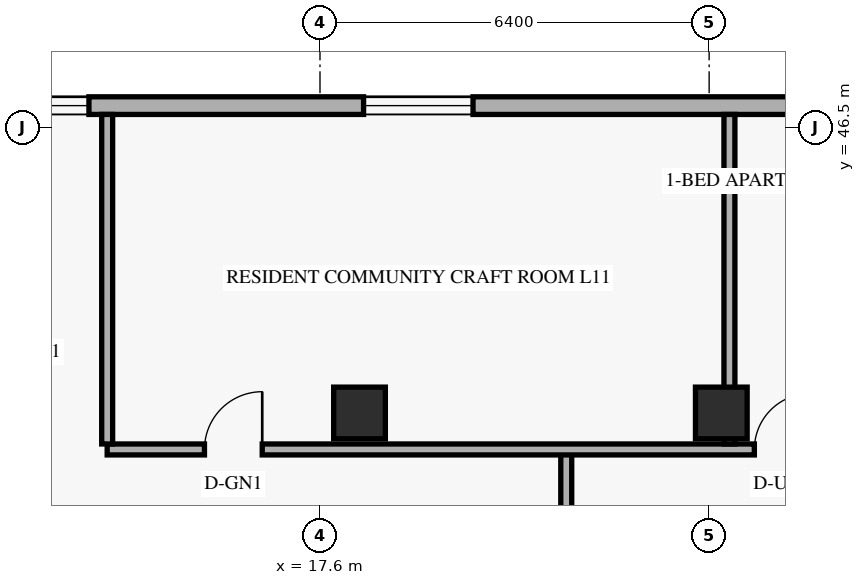
"""IFC4 building model, lengths in metres.
Left out: names, types, materials, properties, quantities, classifications, styles, units other than length and angle.
Written with IfcOpenShell. Run it as: python <this file> out.ifc"""

import sys

from ifc_helpers import new_model, si_unit, direction, frame, frame_2d, origin, origin_2d, place, context, subcontext, project, spatial, rectangle, extrude, element, fill, save


model = new_model("IFC4")
c1 = context("Model", 3, precision=1e-05, world=origin(), true_north=direction((0.0, 1.0)))
c2 = subcontext(c1, "Body", "Model", "MODEL_VIEW")
j1 = project(units=[si_unit("LENGTHUNIT", "METRE"), si_unit("PLANEANGLEUNIT", "RADIAN")], contexts=[c1])
p1 = place(None, origin())
s1 = spatial("IfcSite", under=j1, at=p1, CompositionType="ELEMENT")
p2 = place(p1, origin())
s2 = spatial("IfcBuilding", under=s1, at=p2, CompositionType="ELEMENT")
p3 = place(p2, frame((0.0, 0.0, 45.6)))
s3 = spatial("IfcBuildingStorey", under=s2, at=p3, CompositionType="ELEMENT", Elevation=45.6)
for number, where, z_axis, x_axis in (
    (1, (18.25, 41.8, 0.0), (0.0, 0.0, 1.0), (1.0, 0.0, 0.0)),
    (2, (24.2, 41.8, 0.0), (0.0, 0.0, 1.0), (1.0, 0.0, 0.0)),
):
    element("IfcColumn", number, at=place(p3, frame(where, z_axis=z_axis, x_axis=x_axis)), inside=s3, PredefinedType="COLUMN", context=c2, shape_type="SweptSolid", body=[
        extrude(rectangle(XDim=0.85, YDim=0.85, at=origin_2d()), origin(), (0.0, 0.0, 1.0), 3.6),
    ])
p4 = place(p3, frame((44.98, 46.855, 0.0), z_axis=(0.0, 0.0, 1.0), x_axis=(-1.0, 0.0, 0.0)))
e3 = element("IfcWall", 3, at=p4, inside=s3, PredefinedType="SOLIDWALL", context=c2, shape_type="SweptSolid", body=[
    extrude(rectangle(XDim=39.56, YDim=0.29, at=frame_2d((19.78, 0.0))), origin(), (0.0, 0.0, 1.0), 3.36),
])
p5 = place(p4, frame((35.22, 0.0, 0.85)))
e4 = element("IfcOpeningElement", 4, at=p5, cuts=e3, PredefinedType="OPENING", context=c2, shape_type="SweptSolid", body=[
    extrude(rectangle(XDim=1.8, YDim=1.6, at=frame_2d((0.9, 0.8))), frame((0.0, 0.155, 0.0), z_axis=(0.0, -1.0, 0.0), x_axis=(1.0, 0.0, 0.0)), (0.0, 0.0, 1.0), 0.31),
])
p6 = place(p4, frame((31.18, 0.0, 0.85)))
e5 = element("IfcOpeningElement", 5, at=p6, cuts=e3, PredefinedType="OPENING", context=c2, shape_type="SweptSolid", body=[
    extrude(rectangle(XDim=1.2, YDim=1.5, at=frame_2d((0.6, 0.75))), frame((0.0, 0.155, 0.0), z_axis=(0.0, -1.0, 0.0), x_axis=(1.0, 0.0, 0.0)), (0.0, 0.0, 1.0), 0.31),
])
p7 = place(p4, frame((24.863, 0.0, 0.85)))
e6 = element("IfcOpeningElement", 6, at=p7, cuts=e3, PredefinedType="OPENING", context=c2, shape_type="SweptSolid", body=[
    extrude(rectangle(XDim=1.8, YDim=1.6, at=frame_2d((0.9, 0.8))), frame((0.0, 0.155, 0.0), z_axis=(0.0, -1.0, 0.0), x_axis=(1.0, 0.0, 0.0)), (0.0, 0.0, 1.0), 0.31),
])
p8 = place(p4, frame((16.273, 0.0, 0.85)))
e7 = element("IfcOpeningElement", 7, at=p8, cuts=e3, PredefinedType="OPENING", context=c2, shape_type="SweptSolid", body=[
    extrude(rectangle(XDim=1.8, YDim=1.6, at=frame_2d((0.9, 0.8))), frame((0.0, 0.155, 0.0), z_axis=(0.0, -1.0, 0.0), x_axis=(1.0, 0.0, 0.0)), (0.0, 0.0, 1.0), 0.31),
])
p9 = place(p4, frame((10.73, 0.0, 0.85)))
e8 = element("IfcOpeningElement", 8, at=p9, cuts=e3, PredefinedType="OPENING", context=c2, shape_type="SweptSolid", body=[
    extrude(rectangle(XDim=1.8, YDim=1.6, at=frame_2d((0.9, 0.8))), frame((0.0, 0.155, 0.0), z_axis=(0.0, -1.0, 0.0), x_axis=(1.0, 0.0, 0.0)), (0.0, 0.0, 1.0), 0.31),
])
p10 = place(p4, frame((7.895, 0.0, 0.85)))
e9 = element("IfcOpeningElement", 9, at=p10, cuts=e3, PredefinedType="OPENING", context=c2, shape_type="SweptSolid", body=[
    extrude(rectangle(XDim=1.2, YDim=1.5, at=frame_2d((0.6, 0.75))), frame((0.0, 0.155, 0.0), z_axis=(0.0, -1.0, 0.0), x_axis=(1.0, 0.0, 0.0)), (0.0, 0.0, 1.0), 0.31),
])
p11 = place(p4, frame((3.782, 0.0, 0.85)))
e10 = element("IfcOpeningElement", 10, at=p11, cuts=e3, PredefinedType="OPENING", context=c2, shape_type="SweptSolid", body=[
    extrude(rectangle(XDim=1.8, YDim=1.6, at=frame_2d((0.9, 0.8))), frame((0.0, 0.155, 0.0), z_axis=(0.0, -1.0, 0.0), x_axis=(1.0, 0.0, 0.0)), (0.0, 0.0, 1.0), 0.31),
])
p12 = place(p4, frame((0.367, 0.0, 0.85)))
e11 = element("IfcOpeningElement", 11, at=p12, cuts=e3, PredefinedType="OPENING", context=c2, shape_type="SweptSolid", body=[
    extrude(rectangle(XDim=1.2, YDim=1.5, at=frame_2d((0.6, 0.75))), frame((0.0, 0.155, 0.0), z_axis=(0.0, -1.0, 0.0), x_axis=(1.0, 0.0, 0.0)), (0.0, 0.0, 1.0), 0.31),
])
p13 = place(p3, frame((21.65, 6.8, 0.0), z_axis=(0.0, 0.0, 1.0), x_axis=(0.0, 1.0, 0.0)))
e12 = element("IfcWall", 12, at=p13, inside=s3, PredefinedType="STANDARD", context=c2, shape_type="SweptSolid", body=[
    extrude(rectangle(XDim=34.4, YDim=0.18, at=frame_2d((17.2, 0.0))), origin(), (0.0, 0.0, 1.0), 2.649),
])
p14 = place(p3, frame((14.1, 41.2, 0.0), z_axis=(0.0, 0.0, 1.0), x_axis=(1.0, 0.0, 0.0)))
e13 = element("IfcWall", 13, at=p14, inside=s3, PredefinedType="STANDARD", context=c2, shape_type="SweptSolid", body=[
    extrude(rectangle(XDim=21.32, YDim=0.18, at=frame_2d((10.66, 0.0))), origin(), (0.0, 0.0, 1.0), 2.649),
])
p15 = place(p14, frame((1.6, 0.0, 0.0)))
e14 = element("IfcOpeningElement", 14, at=p15, cuts=e13, PredefinedType="OPENING", context=c2, shape_type="SweptSolid", body=[
    extrude(rectangle(XDim=0.95, YDim=2.15, at=frame_2d((0.475, 1.075))), frame((0.0, 0.1, 0.0), z_axis=(0.0, -1.0, 0.0), x_axis=(1.0, 0.0, 0.0)), (0.0, 0.0, 1.0), 0.2),
])
p16 = place(p14, frame((10.644, 0.0, 0.0)))
e15 = element("IfcOpeningElement", 15, at=p16, cuts=e13, PredefinedType="OPENING", context=c2, shape_type="SweptSolid", body=[
    extrude(rectangle(XDim=0.92, YDim=2.15, at=frame_2d((0.46, 1.075))), frame((0.0, 0.1, 0.0), z_axis=(0.0, -1.0, 0.0), x_axis=(1.0, 0.0, 0.0)), (0.0, 0.0, 1.0), 0.2),
])
p17 = place(p3, frame((14.1, 41.29, 0.0), z_axis=(0.0, 0.0, 1.0), x_axis=(0.0, 1.0, 0.0)))
e16 = element("IfcWall", 16, at=p17, inside=s3, PredefinedType="PARTITIONING", context=c2, shape_type="SweptSolid", body=[
    extrude(rectangle(XDim=5.42, YDim=0.18, at=frame_2d((2.71, 0.0))), origin(), (0.0, 0.0, 1.0), 2.809),
])
p18 = place(p3, frame((24.333, 41.29, 0.0), z_axis=(0.0, 0.0, 1.0), x_axis=(0.0, 1.0, 0.0)))
e17 = element("IfcWall", 17, at=p18, inside=s3, PredefinedType="PARTITIONING", context=c2, shape_type="SweptSolid", body=[
    extrude(rectangle(XDim=5.42, YDim=0.18, at=frame_2d((2.71, 0.0))), origin(), (0.0, 0.0, 1.0), 2.649),
])
p19 = place(p6, origin())
e18 = element("IfcWindow", 18, at=p19, inside=s3, PartitioningType="SINGLE_PANEL", PredefinedType="WINDOW", context=c2, shape_type="SweptSolid", body=[
    extrude(rectangle(XDim=1.2, YDim=1.5, at=frame_2d((0.6, 0.75))), frame((0.0, 0.03, 0.0), z_axis=(0.0, -1.0, 0.0), x_axis=(1.0, 0.0, 0.0)), (0.0, 0.0, 1.0), 0.06),
])
fill(e5, e18)
p20 = place(p7, origin())
e19 = element("IfcWindow", 19, at=p20, inside=s3, PartitioningType="SINGLE_PANEL", PredefinedType="WINDOW", context=c2, shape_type="SweptSolid", body=[
    extrude(rectangle(XDim=1.8, YDim=1.6, at=frame_2d((0.9, 0.8))), frame((0.0, 0.03, 0.0), z_axis=(0.0, -1.0, 0.0), x_axis=(1.0, 0.0, 0.0)), (0.0, 0.0, 1.0), 0.06),
])
fill(e6, e19)
p21 = place(p15, origin())
e20 = element("IfcDoor", 20, at=p21, inside=s3, OperationType="SINGLE_SWING_RIGHT", PredefinedType="DOOR", context=c2, shape_type="SweptSolid", body=[
    extrude(rectangle(XDim=0.95, YDim=2.15, at=frame_2d((0.475, 1.075))), frame((0.0, 0.025, 0.0), z_axis=(0.0, -1.0, 0.0), x_axis=(1.0, 0.0, 0.0)), (0.0, 0.0, 1.0), 0.05),
])
fill(e14, e20)
p22 = place(p16, origin())
e21 = element("IfcDoor", 21, at=p22, inside=s3, OperationType="SINGLE_SWING_RIGHT", PredefinedType="DOOR", context=c2, shape_type="SweptSolid", body=[
    extrude(rectangle(XDim=0.92, YDim=2.15, at=frame_2d((0.46, 1.075))), frame((0.0, 0.025, 0.0), z_axis=(0.0, -1.0, 0.0), x_axis=(1.0, 0.0, 0.0)), (0.0, 0.0, 1.0), 0.05),
])
fill(e15, e21)
save(model, sys.argv[1])
